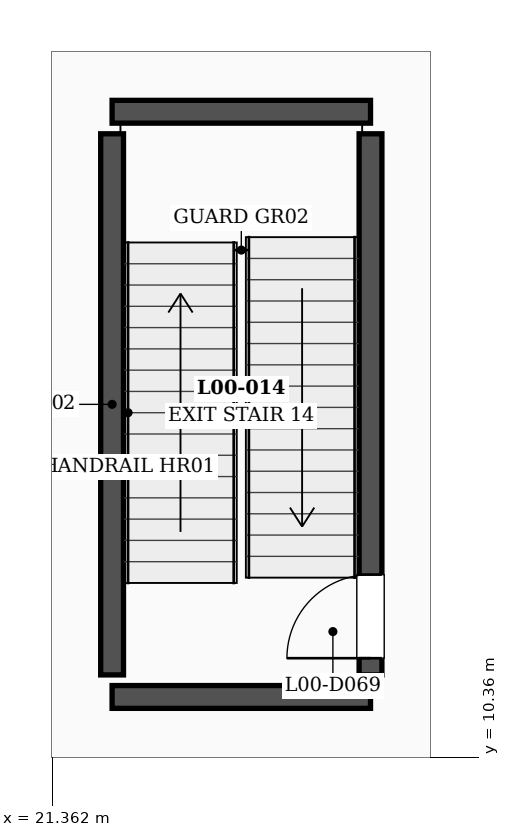
"""IFC4 building model, lengths in metres.
Left out: names, types, materials, properties, quantities, classifications, styles, units other than length and angle.
Written with IfcOpenShell. Run it as: python <this file> out.ifc"""

import sys

from ifc_helpers import new_model, si_unit, direction, frame, frame_2d, origin, place, context, subcontext, project, spatial, rectangle, extrude, element, fill, save


model = new_model("IFC4")
c1 = context("Model", 3, precision=1e-05, world=origin(), true_north=direction((0.0, 1.0)))
c2 = subcontext(c1, "Body", "Model", "MODEL_VIEW")
j1 = project(units=[si_unit("LENGTHUNIT", "METRE"), si_unit("PLANEANGLEUNIT", "RADIAN")], contexts=[c1])
p1 = place(None, origin())
s1 = spatial("IfcSite", under=j1, at=p1, CompositionType="ELEMENT")
p2 = place(p1, origin())
s2 = spatial("IfcBuilding", under=s1, at=p2, CompositionType="ELEMENT")
p3 = place(p2, origin())
s3 = spatial("IfcBuildingStorey", under=s2, at=p3, CompositionType="ELEMENT", Elevation=0.0)
for number, where, z_axis, x_axis in (
    (1, (22.15, 11.15, 0.0), (0.0, 0.0, 1.0), (1.0, 0.0, 0.0)),
    (2, (22.15, 18.85, 0.0), (0.0, 0.0, 1.0), (1.0, 0.0, 0.0)),
):
    element("IfcWall", number, at=place(p3, frame(where, z_axis=z_axis, x_axis=x_axis)), inside=s3, PredefinedType="SHEAR", context=c2, shape_type="SweptSolid", body=[
        extrude(rectangle(XDim=3.4, YDim=0.3, at=frame_2d((1.7, 0.0))), origin(), (0.0, 0.0, 1.0), 6.0),
    ])
p4 = place(p3, frame((22.15, 11.44, 0.0), z_axis=(0.0, 0.0, 1.0), x_axis=(0.0, 1.0, 0.0)))
e3 = element("IfcWall", 3, at=p4, inside=s3, PredefinedType="SHEAR", context=c2, shape_type="SweptSolid", body=[
    extrude(rectangle(XDim=7.12, YDim=0.3, at=frame_2d((3.56, 0.0))), origin(), (0.0, 0.0, 1.0), 6.0),
])
p5 = place(p3, frame((25.55, 11.44, 0.0), z_axis=(0.0, 0.0, 1.0), x_axis=(0.0, 1.0, 0.0)))
e4 = element("IfcWall", 4, at=p5, inside=s3, PredefinedType="SHEAR", context=c2, shape_type="SweptSolid", body=[
    extrude(rectangle(XDim=7.12, YDim=0.3, at=frame_2d((3.56, 0.0))), origin(), (0.0, 0.0, 1.0), 6.0),
])
p6 = place(p5, frame((0.22, 0.0, 0.0)))
e5 = element("IfcOpeningElement", 5, at=p6, cuts=e4, PredefinedType="OPENING", context=c2, shape_type="SweptSolid", body=[
    extrude(rectangle(XDim=1.1, YDim=2.2, at=frame_2d((0.55, 1.1))), frame((0.0, 0.16, 0.0), z_axis=(0.0, -1.0, 0.0), x_axis=(1.0, 0.0, 0.0)), (0.0, 0.0, 1.0), 0.32),
])
p7 = place(p6, origin())
e6 = element("IfcDoor", 6, at=p7, inside=s3, OperationType="SINGLE_SWING_LEFT", PredefinedType="DOOR", context=c2, shape_type="SweptSolid", body=[
    extrude(rectangle(XDim=1.1, YDim=2.2, at=frame_2d((0.55, 1.1))), frame((0.0, 0.025, 0.0), z_axis=(0.0, -1.0, 0.0), x_axis=(1.0, 0.0, 0.0)), (0.0, 0.0, 1.0), 0.05),
])
fill(e5, e6)
save(model, sys.argv[1])
